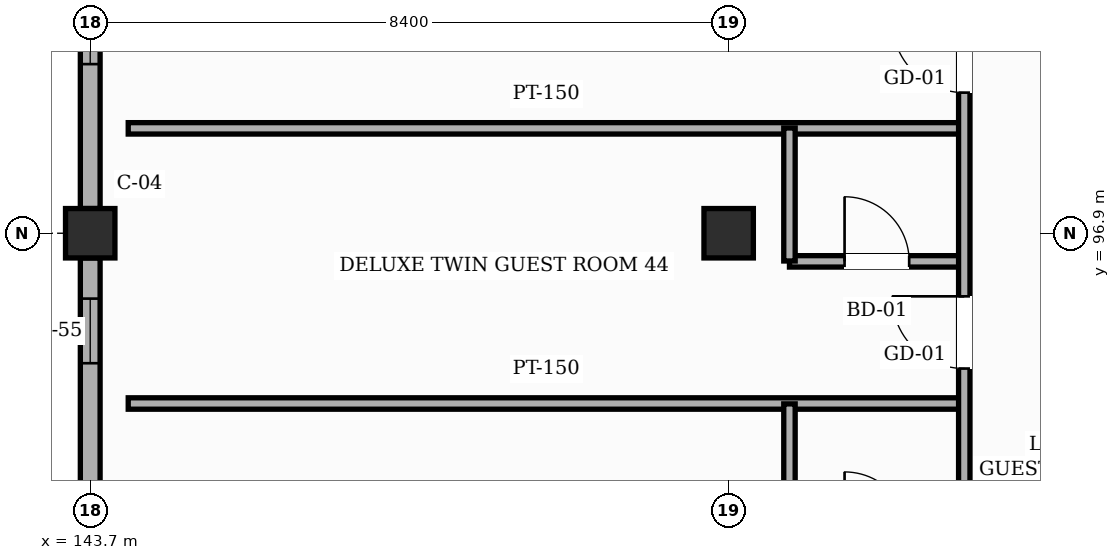
"""IFC4 building model, lengths in metres.
Left out: names, types, materials, properties, quantities, classifications, styles, units other than length and angle.
Written with IfcOpenShell. Run it as: python <this file> out.ifc"""

import sys

from ifc_helpers import new_model, si_unit, direction, frame, frame_2d, origin, origin_2d, place, context, subcontext, project, spatial, rectangle, hollow_rectangle, extrude, element, fill, save


model = new_model("IFC4")
c1 = context("Model", 3, precision=1e-05, world=origin(), true_north=direction((0.0, 1.0)))
c2 = subcontext(c1, "Body", "Model", "MODEL_VIEW")
j1 = project(units=[si_unit("LENGTHUNIT", "METRE"), si_unit("PLANEANGLEUNIT", "RADIAN")], contexts=[c1])
p1 = place(None, origin())
s1 = spatial("IfcSite", under=j1, at=p1, CompositionType="ELEMENT")
p2 = place(p1, origin())
s2 = spatial("IfcBuilding", under=s1, at=p2, CompositionType="ELEMENT")
p3 = place(p2, frame((0.0, 0.0, 19.8)))
s3 = spatial("IfcBuildingStorey", under=s2, at=p3, CompositionType="ELEMENT", Elevation=19.8)
for number, where, z_axis, x_axis in (
    (1, (143.7, 96.9, 0.0), (0.0, 0.0, 1.0), (1.0, 0.0, 0.0)),
    (2, (152.1, 96.9, 0.0), (0.0, 0.0, 1.0), (1.0, 0.0, 0.0)),
):
    element("IfcColumn", number, at=place(p3, frame(where, z_axis=z_axis, x_axis=x_axis)), inside=s3, PredefinedType="COLUMN", context=c2, shape_type="SweptSolid", body=[
        extrude(hollow_rectangle(XDim=0.65, YDim=0.65, WallThickness=0.025, InnerFilletRadius=0.025, OuterFilletRadius=0.05, at=origin_2d()), origin(), (0.0, 0.0, 1.0), 4.8),
    ])
p4 = place(p3, frame((143.7, 89.225, 0.0), z_axis=(0.0, 0.0, 1.0), x_axis=(0.0, 1.0, 0.0)))
e3 = element("IfcWall", 3, at=p4, inside=s3, PredefinedType="SOLIDWALL", context=c2, shape_type="SweptSolid", body=[
    extrude(rectangle(XDim=7.35, YDim=0.26, at=frame_2d((3.675, 0.0))), origin(), (0.0, 0.0, 1.0), 4.005),
])
p5 = place(p4, frame((0.23, 0.0, 0.85)))
e4 = element("IfcOpeningElement", 4, at=p5, cuts=e3, PredefinedType="OPENING", context=c2, shape_type="SweptSolid", body=[
    extrude(rectangle(XDim=1.35, YDim=1.5, at=frame_2d((0.675, 0.75))), frame((0.0, 0.14, 0.0), z_axis=(0.0, -1.0, 0.0), x_axis=(1.0, 0.0, 0.0)), (0.0, 0.0, 1.0), 0.28),
])
p6 = place(p4, frame((2.845, 0.0, 0.85)))
e5 = element("IfcOpeningElement", 5, at=p6, cuts=e3, PredefinedType="OPENING", context=c2, shape_type="SweptSolid", body=[
    extrude(rectangle(XDim=1.55, YDim=1.5, at=frame_2d((0.775, 0.75))), frame((0.0, 0.14, 0.0), z_axis=(0.0, -1.0, 0.0), x_axis=(1.0, 0.0, 0.0)), (0.0, 0.0, 1.0), 0.28),
])
p7 = place(p4, frame((5.965, 0.0, 0.85)))
e6 = element("IfcOpeningElement", 6, at=p7, cuts=e3, PredefinedType="OPENING", context=c2, shape_type="SweptSolid", body=[
    extrude(rectangle(XDim=0.85, YDim=1.35, at=frame_2d((0.425, 0.675))), frame((0.0, 0.14, 0.0), z_axis=(0.0, -1.0, 0.0), x_axis=(1.0, 0.0, 0.0)), (0.0, 0.0, 1.0), 0.28),
])
p8 = place(p3, frame((143.7, 97.225, 0.0), z_axis=(0.0, 0.0, 1.0), x_axis=(0.0, 1.0, 0.0)))
e7 = element("IfcWall", 7, at=p8, inside=s3, PredefinedType="SOLIDWALL", context=c2, shape_type="SweptSolid", body=[
    extrude(rectangle(XDim=7.9, YDim=0.26, at=frame_2d((3.95, 0.0))), origin(), (0.0, 0.0, 1.0), 3.855),
])
p9 = place(p8, frame((1.9, 0.0, 0.85)))
e8 = element("IfcOpeningElement", 8, at=p9, cuts=e7, PredefinedType="OPENING", context=c2, shape_type="SweptSolid", body=[
    extrude(rectangle(XDim=1.95, YDim=1.5, at=frame_2d((0.975, 0.75))), frame((0.0, 0.14, 0.0), z_axis=(0.0, -1.0, 0.0), x_axis=(1.0, 0.0, 0.0)), (0.0, 0.0, 1.0), 0.28),
])
p10 = place(p8, frame((5.17, 0.0, 0.85)))
e9 = element("IfcOpeningElement", 9, at=p10, cuts=e7, PredefinedType="OPENING", context=c2, shape_type="SweptSolid", body=[
    extrude(rectangle(XDim=2.25, YDim=1.5, at=frame_2d((1.125, 0.75))), frame((0.0, 0.14, 0.0), z_axis=(0.0, -1.0, 0.0), x_axis=(1.0, 0.0, 0.0)), (0.0, 0.0, 1.0), 0.28),
])
p11 = place(p3, frame((144.2, 94.66, 0.0), z_axis=(0.0, 0.0, 1.0), x_axis=(1.0, 0.0, 0.0)))
e10 = element("IfcWall", 10, at=p11, inside=s3, PredefinedType="PARTITIONING", context=c2, shape_type="SweptSolid", body=[
    extrude(rectangle(XDim=11.0, YDim=0.15, at=frame_2d((5.5, 0.0))), origin(), (0.0, 0.0, 1.0), 4.565),
])
p12 = place(p3, frame((152.9, 96.53, 0.0), z_axis=(0.0, 0.0, 1.0), x_axis=(1.0, 0.0, 0.0)))
e11 = element("IfcWall", 11, at=p12, inside=s3, PredefinedType="PARTITIONING", context=c2, shape_type="SweptSolid", body=[
    extrude(rectangle(XDim=2.3, YDim=0.15, at=frame_2d((1.15, 0.0))), origin(), (0.0, 0.0, 1.0), 3.905),
])
p13 = place(p12, frame((0.725, 0.0, 0.0)))
e12 = element("IfcOpeningElement", 12, at=p13, cuts=e11, PredefinedType="OPENING", context=c2, shape_type="SweptSolid", body=[
    extrude(rectangle(XDim=0.85, YDim=2.1, at=frame_2d((0.425, 1.05))), frame((0.0, 0.085, 0.0), z_axis=(0.0, -1.0, 0.0), x_axis=(1.0, 0.0, 0.0)), (0.0, 0.0, 1.0), 0.17),
])
p14 = place(p3, frame((144.2, 98.28, 0.0), z_axis=(0.0, 0.0, 1.0), x_axis=(1.0, 0.0, 0.0)))
e13 = element("IfcWall", 13, at=p14, inside=s3, PredefinedType="PARTITIONING", context=c2, shape_type="SweptSolid", body=[
    extrude(rectangle(XDim=11.0, YDim=0.15, at=frame_2d((5.5, 0.0))), origin(), (0.0, 0.0, 1.0), 4.565),
])
for number, where, z_axis, x_axis in (
    (14, (152.9, 92.905, 0.0), (0.0, 0.0, 1.0), (0.0, 1.0, 0.0)),
    (15, (152.9, 96.535, 0.0), (0.0, 0.0, 1.0), (0.0, 1.0, 0.0)),
):
    element("IfcWall", number, at=place(p3, frame(where, z_axis=z_axis, x_axis=x_axis)), inside=s3, PredefinedType="PARTITIONING", context=c2, shape_type="SweptSolid", body=[
        extrude(rectangle(XDim=1.75, YDim=0.15, at=frame_2d((0.875, 0.0))), origin(), (0.0, 0.0, 1.0), 4.565),
    ])
p15 = place(p3, frame((155.2, 62.0, 0.0), z_axis=(0.0, 0.0, 1.0), x_axis=(0.0, 1.0, 0.0)))
e16 = element("IfcWall", 16, at=p15, inside=s3, PredefinedType="PARTITIONING", context=c2, shape_type="SweptSolid", body=[
    extrude(rectangle(XDim=50.8, YDim=0.15, at=frame_2d((25.4, 0.0))), origin(), (0.0, 0.0, 1.0), 4.565),
])
p16 = place(p15, frame((0.465, 0.0, 0.0)))
e17 = element("IfcOpeningElement", 17, at=p16, cuts=e16, PredefinedType="OPENING", context=c2, shape_type="SweptSolid", body=[
    extrude(rectangle(XDim=0.95, YDim=2.15, at=frame_2d((0.475, 1.075))), frame((0.0, 0.085, 0.0), z_axis=(0.0, -1.0, 0.0), x_axis=(1.0, 0.0, 0.0)), (0.0, 0.0, 1.0), 0.17),
])
p17 = place(p15, frame((4.09, 0.0, 0.0)))
e18 = element("IfcOpeningElement", 18, at=p17, cuts=e16, PredefinedType="OPENING", context=c2, shape_type="SweptSolid", body=[
    extrude(rectangle(XDim=0.95, YDim=2.15, at=frame_2d((0.475, 1.075))), frame((0.0, 0.085, 0.0), z_axis=(0.0, -1.0, 0.0), x_axis=(1.0, 0.0, 0.0)), (0.0, 0.0, 1.0), 0.17),
])
p18 = place(p15, frame((7.72, 0.0, 0.0)))
e19 = element("IfcOpeningElement", 19, at=p18, cuts=e16, PredefinedType="OPENING", context=c2, shape_type="SweptSolid", body=[
    extrude(rectangle(XDim=0.95, YDim=2.15, at=frame_2d((0.475, 1.075))), frame((0.0, 0.085, 0.0), z_axis=(0.0, -1.0, 0.0), x_axis=(1.0, 0.0, 0.0)), (0.0, 0.0, 1.0), 0.17),
])
p19 = place(p15, frame((11.35, 0.0, 0.0)))
e20 = element("IfcOpeningElement", 20, at=p19, cuts=e16, PredefinedType="OPENING", context=c2, shape_type="SweptSolid", body=[
    extrude(rectangle(XDim=0.95, YDim=2.15, at=frame_2d((0.475, 1.075))), frame((0.0, 0.085, 0.0), z_axis=(0.0, -1.0, 0.0), x_axis=(1.0, 0.0, 0.0)), (0.0, 0.0, 1.0), 0.17),
])
p20 = place(p15, frame((14.98, 0.0, 0.0)))
e21 = element("IfcOpeningElement", 21, at=p20, cuts=e16, PredefinedType="OPENING", context=c2, shape_type="SweptSolid", body=[
    extrude(rectangle(XDim=0.95, YDim=2.15, at=frame_2d((0.475, 1.075))), frame((0.0, 0.085, 0.0), z_axis=(0.0, -1.0, 0.0), x_axis=(1.0, 0.0, 0.0)), (0.0, 0.0, 1.0), 0.17),
])
p21 = place(p15, frame((18.61, 0.0, 0.0)))
e22 = element("IfcOpeningElement", 22, at=p21, cuts=e16, PredefinedType="OPENING", context=c2, shape_type="SweptSolid", body=[
    extrude(rectangle(XDim=0.95, YDim=2.15, at=frame_2d((0.475, 1.075))), frame((0.0, 0.085, 0.0), z_axis=(0.0, -1.0, 0.0), x_axis=(1.0, 0.0, 0.0)), (0.0, 0.0, 1.0), 0.17),
])
p22 = place(p15, frame((22.235, 0.0, 0.0)))
e23 = element("IfcOpeningElement", 23, at=p22, cuts=e16, PredefinedType="OPENING", context=c2, shape_type="SweptSolid", body=[
    extrude(rectangle(XDim=0.95, YDim=2.15, at=frame_2d((0.475, 1.075))), frame((0.0, 0.085, 0.0), z_axis=(0.0, -1.0, 0.0), x_axis=(1.0, 0.0, 0.0)), (0.0, 0.0, 1.0), 0.17),
])
p23 = place(p15, frame((25.865, 0.0, 0.0)))
e24 = element("IfcOpeningElement", 24, at=p23, cuts=e16, PredefinedType="OPENING", context=c2, shape_type="SweptSolid", body=[
    extrude(rectangle(XDim=0.95, YDim=2.15, at=frame_2d((0.475, 1.075))), frame((0.0, 0.085, 0.0), z_axis=(0.0, -1.0, 0.0), x_axis=(1.0, 0.0, 0.0)), (0.0, 0.0, 1.0), 0.17),
])
p24 = place(p15, frame((29.49, 0.0, 0.0)))
e25 = element("IfcOpeningElement", 25, at=p24, cuts=e16, PredefinedType="OPENING", context=c2, shape_type="SweptSolid", body=[
    extrude(rectangle(XDim=0.95, YDim=2.15, at=frame_2d((0.475, 1.075))), frame((0.0, 0.085, 0.0), z_axis=(0.0, -1.0, 0.0), x_axis=(1.0, 0.0, 0.0)), (0.0, 0.0, 1.0), 0.17),
])
p25 = place(p15, frame((33.12, 0.0, 0.0)))
e26 = element("IfcOpeningElement", 26, at=p25, cuts=e16, PredefinedType="OPENING", context=c2, shape_type="SweptSolid", body=[
    extrude(rectangle(XDim=0.95, YDim=2.15, at=frame_2d((0.475, 1.075))), frame((0.0, 0.085, 0.0), z_axis=(0.0, -1.0, 0.0), x_axis=(1.0, 0.0, 0.0)), (0.0, 0.0, 1.0), 0.17),
])
p26 = place(p15, frame((36.75, 0.0, 0.0)))
e27 = element("IfcOpeningElement", 27, at=p26, cuts=e16, PredefinedType="OPENING", context=c2, shape_type="SweptSolid", body=[
    extrude(rectangle(XDim=0.95, YDim=2.15, at=frame_2d((0.475, 1.075))), frame((0.0, 0.085, 0.0), z_axis=(0.0, -1.0, 0.0), x_axis=(1.0, 0.0, 0.0)), (0.0, 0.0, 1.0), 0.17),
])
p27 = place(p15, frame((40.38, 0.0, 0.0)))
e28 = element("IfcOpeningElement", 28, at=p27, cuts=e16, PredefinedType="OPENING", context=c2, shape_type="SweptSolid", body=[
    extrude(rectangle(XDim=0.95, YDim=2.15, at=frame_2d((0.475, 1.075))), frame((0.0, 0.085, 0.0), z_axis=(0.0, -1.0, 0.0), x_axis=(1.0, 0.0, 0.0)), (0.0, 0.0, 1.0), 0.17),
])
p28 = place(p15, frame((44.01, 0.0, 0.0)))
e29 = element("IfcOpeningElement", 29, at=p28, cuts=e16, PredefinedType="OPENING", context=c2, shape_type="SweptSolid", body=[
    extrude(rectangle(XDim=0.95, YDim=2.15, at=frame_2d((0.475, 1.075))), frame((0.0, 0.085, 0.0), z_axis=(0.0, -1.0, 0.0), x_axis=(1.0, 0.0, 0.0)), (0.0, 0.0, 1.0), 0.17),
])
p29 = place(p15, frame((47.635, 0.0, 0.0)))
e30 = element("IfcOpeningElement", 30, at=p29, cuts=e16, PredefinedType="OPENING", context=c2, shape_type="SweptSolid", body=[
    extrude(rectangle(XDim=0.95, YDim=2.15, at=frame_2d((0.475, 1.075))), frame((0.0, 0.085, 0.0), z_axis=(0.0, -1.0, 0.0), x_axis=(1.0, 0.0, 0.0)), (0.0, 0.0, 1.0), 0.17),
])
p30 = place(p7, origin())
e31 = element("IfcWindow", 31, at=p30, inside=s3, PartitioningType="SINGLE_PANEL", PredefinedType="WINDOW", context=c2, shape_type="SweptSolid", body=[
    extrude(rectangle(XDim=0.85, YDim=1.35, at=frame_2d((0.425, 0.675))), frame((0.0, 0.03, 0.0), z_axis=(0.0, -1.0, 0.0), x_axis=(1.0, 0.0, 0.0)), (0.0, 0.0, 1.0), 0.06),
])
fill(e6, e31)
p31 = place(p9, origin())
e32 = element("IfcWindow", 32, at=p31, inside=s3, PartitioningType="SINGLE_PANEL", PredefinedType="WINDOW", context=c2, shape_type="SweptSolid", body=[
    extrude(rectangle(XDim=1.95, YDim=1.5, at=frame_2d((0.975, 0.75))), frame((0.0, 0.03, 0.0), z_axis=(0.0, -1.0, 0.0), x_axis=(1.0, 0.0, 0.0)), (0.0, 0.0, 1.0), 0.06),
])
fill(e8, e32)
p32 = place(p25, origin())
e33 = element("IfcDoor", 33, at=p32, inside=s3, OperationType="SINGLE_SWING_RIGHT", PredefinedType="DOOR", context=c2, shape_type="SweptSolid", body=[
    extrude(rectangle(XDim=0.95, YDim=2.15, at=frame_2d((0.475, 1.075))), frame((0.0, 0.025, 0.0), z_axis=(0.0, -1.0, 0.0), x_axis=(1.0, 0.0, 0.0)), (0.0, 0.0, 1.0), 0.05),
])
fill(e26, e33)
p33 = place(p13, origin())
e34 = element("IfcDoor", 34, at=p33, inside=s3, OperationType="SINGLE_SWING_LEFT", PredefinedType="DOOR", context=c2, shape_type="SweptSolid", body=[
    extrude(rectangle(XDim=0.85, YDim=2.1, at=frame_2d((0.425, 1.05))), frame((0.0, 0.025, 0.0), z_axis=(0.0, -1.0, 0.0), x_axis=(1.0, 0.0, 0.0)), (0.0, 0.0, 1.0), 0.05),
])
fill(e12, e34)
p34 = place(p26, origin())
e35 = element("IfcDoor", 35, at=p34, inside=s3, OperationType="SINGLE_SWING_RIGHT", PredefinedType="DOOR", context=c2, shape_type="SweptSolid", body=[
    extrude(rectangle(XDim=0.95, YDim=2.15, at=frame_2d((0.475, 1.075))), frame((0.0, 0.025, 0.0), z_axis=(0.0, -1.0, 0.0), x_axis=(1.0, 0.0, 0.0)), (0.0, 0.0, 1.0), 0.05),
])
fill(e27, e35)
save(model, sys.argv[1])
